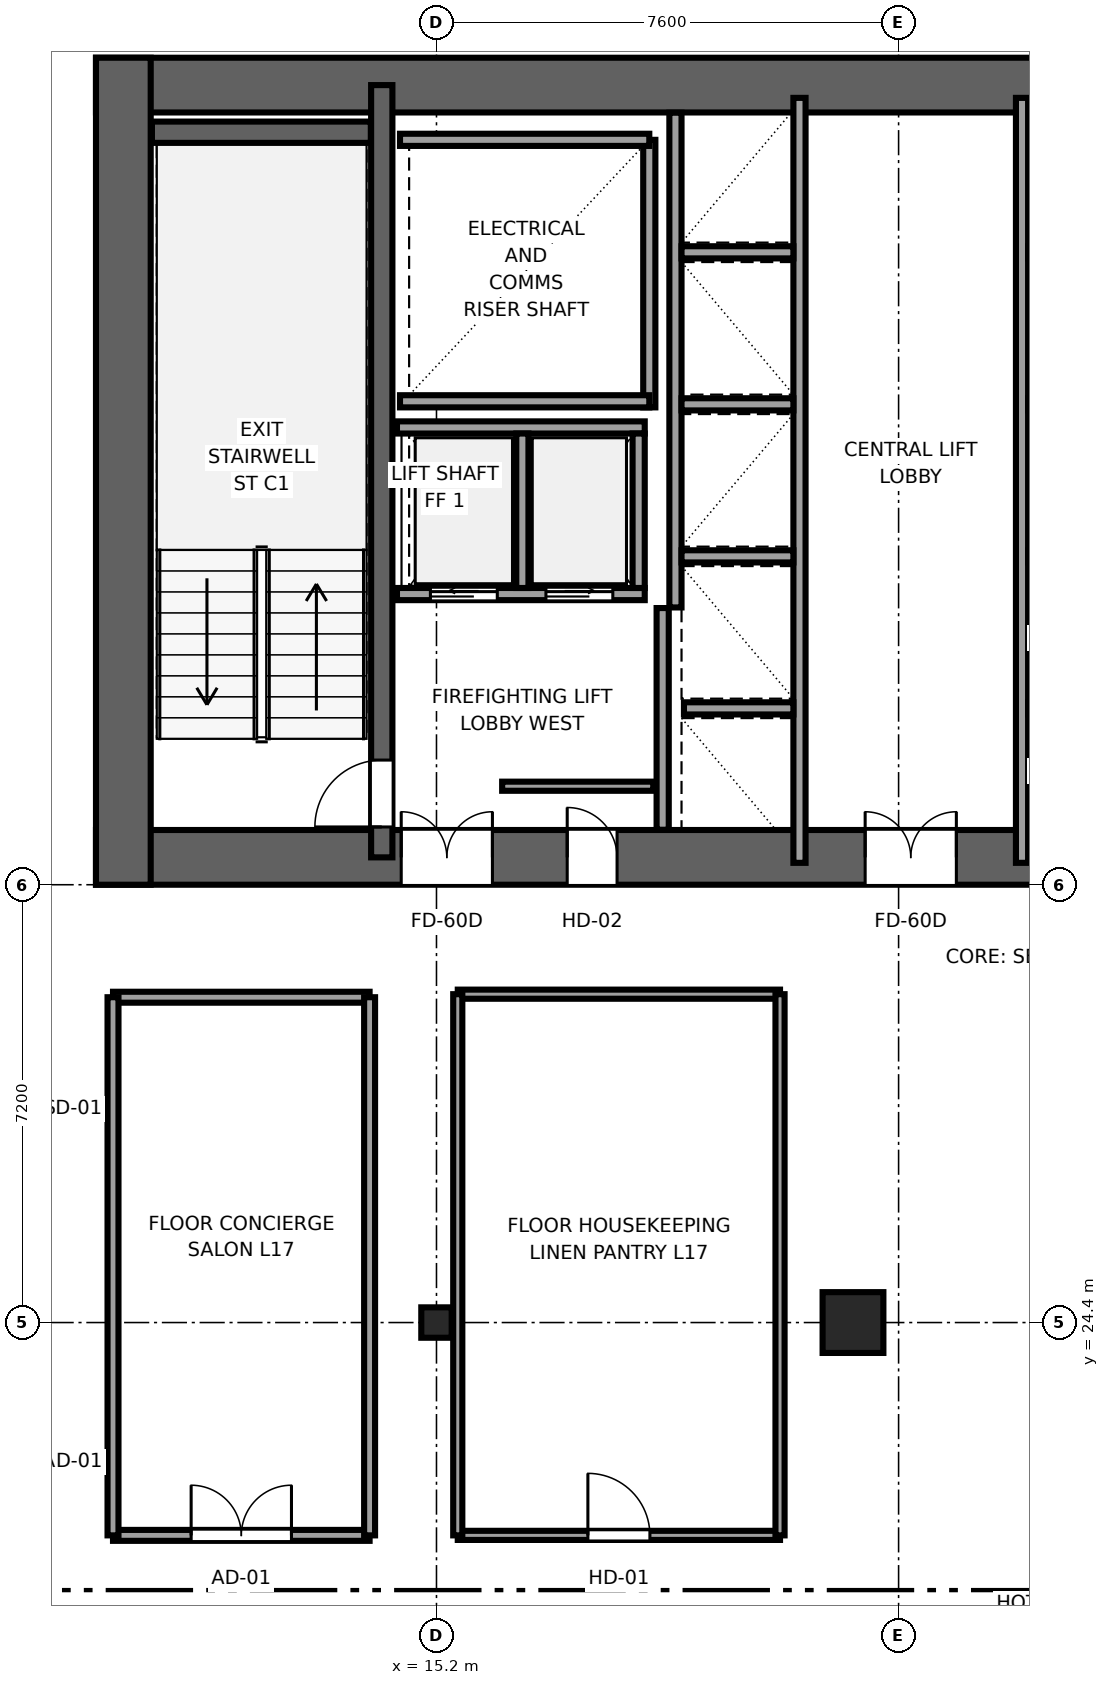
"""IFC4 building model, lengths in metres.
Left out: names, types, materials, properties, quantities, classifications, styles, units other than length and angle.
Written with IfcOpenShell. Run it as: python <this file> out.ifc"""

import sys

from ifc_helpers import new_model, si_unit, direction, frame, frame_2d, origin, origin_2d, place, context, subcontext, project, spatial, rectangle, i_section, extrude, source, transform, mapped, element, fill, save


model = new_model("IFC4")
c1 = context("Model", 3, precision=1e-05, world=origin(), true_north=direction((0.0, 1.0)))
c2 = subcontext(c1, "Body", "Model", "MODEL_VIEW")
j1 = project(units=[si_unit("LENGTHUNIT", "METRE"), si_unit("PLANEANGLEUNIT", "RADIAN")], contexts=[c1])
p1 = place(None, origin())
s1 = spatial("IfcSite", under=j1, at=p1, CompositionType="ELEMENT")
p2 = place(p1, origin())
s2 = spatial("IfcBuilding", under=s1, at=p2, CompositionType="ELEMENT")
p3 = place(p2, frame((0.0, 0.0, 71.05)))
s3 = spatial("IfcBuildingStorey", under=s2, at=p3, CompositionType="ELEMENT", Elevation=71.05)
p4 = place(p3, frame((9.6, 32.05, 0.0), z_axis=(0.0, 0.0, 1.0), x_axis=(1.0, 0.0, 0.0)))
e1 = element("IfcWall", 1, at=p4, inside=s3, PredefinedType="SHEAR", context=c2, shape_type="SweptSolid", body=[
    extrude(rectangle(XDim=26.8, YDim=0.9, at=frame_2d((13.4, 0.0))), origin(), (0.0, 0.0, 1.0), 3.55),
])
p5 = place(p4, frame((6.52, 0.0, 0.0), z_axis=(0.0, 0.0, 1.0), x_axis=(-1.0, 0.0, 0.0)))
e2 = element("IfcOpeningElement", 2, at=p5, cuts=e1, PredefinedType="OPENING", context=c2, shape_type="SweptSolid", body=[
    extrude(rectangle(XDim=1.5, YDim=2.04, at=frame_2d((0.75, 1.02))), frame((0.0, 0.46, 0.0), z_axis=(0.0, -1.0, 0.0), x_axis=(1.0, 0.0, 0.0)), (0.0, 0.0, 1.0), 0.92),
])
p6 = place(p4, frame((14.15, 0.0, 0.0), z_axis=(0.0, 0.0, 1.0), x_axis=(-1.0, 0.0, 0.0)))
e3 = element("IfcOpeningElement", 3, at=p6, cuts=e1, PredefinedType="OPENING", context=c2, shape_type="SweptSolid", body=[
    extrude(rectangle(XDim=1.5, YDim=2.04, at=frame_2d((0.75, 1.02))), frame((0.0, 0.46, 0.0), z_axis=(0.0, -1.0, 0.0), x_axis=(1.0, 0.0, 0.0)), (0.0, 0.0, 1.0), 0.92),
])
p7 = place(p4, frame((21.78, 0.0, 0.0), z_axis=(0.0, 0.0, 1.0), x_axis=(-1.0, 0.0, 0.0)))
e4 = element("IfcOpeningElement", 4, at=p7, cuts=e1, PredefinedType="OPENING", context=c2, shape_type="SweptSolid", body=[
    extrude(rectangle(XDim=1.5, YDim=2.04, at=frame_2d((0.75, 1.02))), frame((0.0, 0.46, 0.0), z_axis=(0.0, -1.0, 0.0), x_axis=(1.0, 0.0, 0.0)), (0.0, 0.0, 1.0), 0.92),
])
p8 = place(p4, frame((8.57, 0.0, 0.0), z_axis=(0.0, 0.0, 1.0), x_axis=(-1.0, 0.0, 0.0)))
e5 = element("IfcOpeningElement", 5, at=p8, cuts=e1, PredefinedType="OPENING", context=c2, shape_type="SweptSolid", body=[
    extrude(rectangle(XDim=0.82, YDim=2.01, at=frame_2d((0.41, 1.005))), frame((0.0, 0.46, 0.0), z_axis=(0.0, -1.0, 0.0), x_axis=(1.0, 0.0, 0.0)), (0.0, 0.0, 1.0), 0.92),
])
p9 = place(p4, frame((19.07, 0.0, 0.0), z_axis=(0.0, 0.0, 1.0), x_axis=(-1.0, 0.0, 0.0)))
e6 = element("IfcOpeningElement", 6, at=p9, cuts=e1, PredefinedType="OPENING", context=c2, shape_type="SweptSolid", body=[
    extrude(rectangle(XDim=0.82, YDim=2.01, at=frame_2d((0.41, 1.005))), frame((0.0, 0.46, 0.0), z_axis=(0.0, -1.0, 0.0), x_axis=(1.0, 0.0, 0.0)), (0.0, 0.0, 1.0), 0.92),
])
p10 = place(p3, frame((9.6, 44.75, 0.0), z_axis=(0.0, 0.0, 1.0), x_axis=(1.0, 0.0, 0.0)))
e7 = element("IfcWall", 7, at=p10, inside=s3, PredefinedType="SHEAR", context=c2, shape_type="SweptSolid", body=[
    extrude(rectangle(XDim=26.8, YDim=0.9, at=frame_2d((13.4, 0.0))), origin(), (0.0, 0.0, 1.0), 3.55),
])
p11 = place(p3, frame((10.05, 31.6, 0.0), z_axis=(0.0, 0.0, 1.0), x_axis=(0.0, 1.0, 0.0)))
e8 = element("IfcWall", 8, at=p11, inside=s3, PredefinedType="SHEAR", context=c2, shape_type="SweptSolid", body=[
    extrude(rectangle(XDim=13.6, YDim=0.9, at=frame_2d((6.8, 0.0))), origin(), (0.0, 0.0, 1.0), 3.55),
])
p12 = place(p3, frame((14.3, 32.05, 0.0), z_axis=(0.0, 0.0, 1.0), x_axis=(0.0, 1.0, 0.0)))
e9 = element("IfcWall", 9, at=p12, inside=s3, PredefinedType="SHEAR", context=c2, shape_type="SweptSolid", body=[
    extrude(rectangle(XDim=12.7, YDim=0.35, at=frame_2d((6.35, 0.0))), origin(), (0.0, 0.0, 1.0), 3.55),
])
p13 = place(p12, frame((0.5, 0.0, 0.0)))
e10 = element("IfcOpeningElement", 10, at=p13, cuts=e9, PredefinedType="OPENING", context=c2, shape_type="SweptSolid", body=[
    extrude(rectangle(XDim=1.1, YDim=2.12, at=frame_2d((0.55, 1.06))), frame((0.0, 0.185, 0.0), z_axis=(0.0, -1.0, 0.0), x_axis=(1.0, 0.0, 0.0)), (0.0, 0.0, 1.0), 0.37),
])
p14 = place(p3, frame((10.52, 43.975, 0.0), z_axis=(0.0, 0.0, 1.0), x_axis=(1.0, 0.0, 0.0)))
e11 = element("IfcWall", 11, at=p14, inside=s3, PredefinedType="SHEAR", context=c2, shape_type="SweptSolid", body=[
    extrude(rectangle(XDim=3.6, YDim=0.35, at=frame_2d((1.8, 0.0))), origin(), (0.0, 0.0, 1.0), 3.55),
])
m1 = source(origin(), c2, "Body", "SweptSolid", [
    extrude(i_section(OverallWidth=0.5, OverallDepth=0.5, WebThickness=0.028, FlangeThickness=0.045, at=origin_2d()), origin(), (0.0, 0.0, 1.0), 3.55),
])
p15 = place(p3, frame((15.2, 24.4, 0.0), z_axis=(0.0, 0.0, 1.0), x_axis=(1.0, 0.0, 0.0)))
e12 = element("IfcColumn", 12, at=p15, inside=s3, PredefinedType="COLUMN", context=c2, shape_type="MappedRepresentation", body=[
    mapped(m1, transform((0.0, 0.0, 0.0), x_axis=(1.0, 0.0, 0.0), y_axis=(0.0, 1.0, 0.0), z_axis=(0.0, 0.0, 1.0), scale=1.0)),
])
m2 = source(origin(), c2, "Body", "SweptSolid", [
    extrude(rectangle(XDim=1.0, YDim=1.0, at=origin_2d()), origin(), (0.0, 0.0, 1.0), 3.55),
])
p16 = place(p3, frame((22.05, 24.4, 0.0), z_axis=(0.0, 0.0, 1.0), x_axis=(1.0, 0.0, 0.0)))
e13 = element("IfcColumn", 13, at=p16, inside=s3, PredefinedType="COLUMN", context=c2, shape_type="MappedRepresentation", body=[
    mapped(m2, transform((0.0, 0.0, 0.0), x_axis=(1.0, 0.0, 0.0), y_axis=(0.0, 1.0, 0.0), z_axis=(0.0, 0.0, 1.0), scale=1.0)),
])
p17 = place(p3, frame((18.7, 39.45, 0.0), z_axis=(0.0, 0.0, 1.0), x_axis=(0.0, 1.0, 0.0)))
e14 = element("IfcWall", 14, at=p17, inside=s3, PredefinedType="SOLIDWALL", context=c2, shape_type="SweptSolid", body=[
    extrude(rectangle(XDim=4.4, YDim=0.2, at=frame_2d((2.2, 0.0))), origin(), (0.0, 0.0, 1.0), 3.37),
])
for number, where, z_axis, x_axis in (
    (15, (14.6, 39.55, 0.0), (0.0, 0.0, 1.0), (1.0, 0.0, 0.0)),
    (16, (14.6, 43.85, 0.0), (0.0, 0.0, 1.0), (1.0, 0.0, 0.0)),
):
    element("IfcWall", number, at=place(p3, frame(where, z_axis=z_axis, x_axis=x_axis)), inside=s3, PredefinedType="SOLIDWALL", context=c2, shape_type="SweptSolid", body=[
        extrude(rectangle(XDim=4.1, YDim=0.2, at=frame_2d((2.05, 0.0))), origin(), (0.0, 0.0, 1.0), 3.37),
    ])
p18 = place(p3, frame((18.92, 32.504, 0.0), z_axis=(0.0, 0.0, 1.0), x_axis=(0.0, 1.0, 0.0)))
e17 = element("IfcWall", 17, at=p18, inside=s3, PredefinedType="SOLIDWALL", context=c2, shape_type="SweptSolid", body=[
    extrude(rectangle(XDim=3.646, YDim=0.2, at=frame_2d((1.823, 0.0))), origin(), (0.0, 0.0, 1.0), 3.37),
])
p19 = place(p3, frame((21.17, 31.96, 0.0), z_axis=(0.0, 0.0, 1.0), x_axis=(0.0, 1.0, 0.0)))
e18 = element("IfcWall", 18, at=p19, inside=s3, PredefinedType="SOLIDWALL", context=c2, shape_type="SweptSolid", body=[
    extrude(rectangle(XDim=12.58, YDim=0.2, at=frame_2d((6.29, 0.0))), origin(), (0.0, 0.0, 1.0), 3.37),
])
p20 = place(p3, frame((19.13, 36.16, 0.0), z_axis=(0.0, 0.0, 1.0), x_axis=(0.0, 1.0, 0.0)))
e19 = element("IfcWall", 19, at=p20, inside=s3, PredefinedType="SOLIDWALL", context=c2, shape_type="SweptSolid", body=[
    extrude(rectangle(XDim=8.136, YDim=0.2, at=frame_2d((4.068, 0.0))), origin(), (0.0, 0.0, 1.0), 3.37),
])
p21 = place(p3, frame((19.27, 34.5, 0.0), z_axis=(0.0, 0.0, 1.0), x_axis=(1.0, 0.0, 0.0)))
e20 = element("IfcWall", 20, at=p21, inside=s3, PredefinedType="SOLIDWALL", context=c2, shape_type="SweptSolid", body=[
    extrude(rectangle(XDim=1.8, YDim=0.2, at=frame_2d((0.9, 0.0))), origin(), (0.0, 0.0, 1.0), 3.37),
])
for number, where, z_axis, x_axis in (
    (21, (19.23, 37.0, 0.0), (0.0, 0.0, 1.0), (1.0, 0.0, 0.0)),
    (22, (19.23, 39.5, 0.0), (0.0, 0.0, 1.0), (1.0, 0.0, 0.0)),
    (23, (19.23, 42.0, 0.0), (0.0, 0.0, 1.0), (1.0, 0.0, 0.0)),
):
    element("IfcWall", number, at=place(p3, frame(where, z_axis=z_axis, x_axis=x_axis)), inside=s3, PredefinedType="SOLIDWALL", context=c2, shape_type="SweptSolid", body=[
        extrude(rectangle(XDim=1.84, YDim=0.2, at=frame_2d((0.92, 0.0))), origin(), (0.0, 0.0, 1.0), 3.37),
    ])
p22 = place(p3, frame((14.55, 36.38, 0.0), z_axis=(0.0, 0.0, 1.0), x_axis=(1.0, 0.0, 0.0)))
e24 = element("IfcWall", 24, at=p22, inside=s3, PredefinedType="SOLIDWALL", context=c2, shape_type="SweptSolid", body=[
    extrude(rectangle(XDim=4.075, YDim=0.2, at=frame_2d((2.038, 0.0))), origin(), (0.0, 0.0, 1.0), 3.37),
])
p23 = place(p22, frame((0.55, 0.0, 0.0)))
e25 = element("IfcOpeningElement", 25, at=p23, cuts=e24, PredefinedType="OPENING", context=c2, shape_type="SweptSolid", body=[
    extrude(rectangle(XDim=1.1, YDim=2.12, at=frame_2d((0.55, 1.06))), frame((0.0, 0.11, 0.0), z_axis=(0.0, -1.0, 0.0), x_axis=(1.0, 0.0, 0.0)), (0.0, 0.0, 1.0), 0.22),
])
p24 = place(p22, frame((2.45, 0.0, 0.0)))
e26 = element("IfcOpeningElement", 26, at=p24, cuts=e24, PredefinedType="OPENING", context=c2, shape_type="SweptSolid", body=[
    extrude(rectangle(XDim=1.1, YDim=2.12, at=frame_2d((0.55, 1.06))), frame((0.0, 0.11, 0.0), z_axis=(0.0, -1.0, 0.0), x_axis=(1.0, 0.0, 0.0)), (0.0, 0.0, 1.0), 0.22),
])
p25 = place(p3, frame((14.55, 39.12, 0.0), z_axis=(0.0, 0.0, 1.0), x_axis=(1.0, 0.0, 0.0)))
e27 = element("IfcWall", 27, at=p25, inside=s3, PredefinedType="SOLIDWALL", context=c2, shape_type="SweptSolid", body=[
    extrude(rectangle(XDim=4.075, YDim=0.2, at=frame_2d((2.038, 0.0))), origin(), (0.0, 0.0, 1.0), 3.37),
])
for number, where, z_axis, x_axis in (
    (28, (18.525, 36.48, 0.0), (0.0, 0.0, 1.0), (0.0, 1.0, 0.0)),
    (29, (16.613, 36.48, 0.0), (0.0, 0.0, 1.0), (0.0, 1.0, 0.0)),
):
    element("IfcWall", number, at=place(p3, frame(where, z_axis=z_axis, x_axis=x_axis)), inside=s3, PredefinedType="SOLIDWALL", context=c2, shape_type="SweptSolid", body=[
        extrude(rectangle(XDim=2.54, YDim=0.2, at=frame_2d((1.27, 0.0))), origin(), (0.0, 0.0, 1.0), 3.37),
    ])
p26 = place(p3, frame((24.83, 31.96, 0.0), z_axis=(0.0, 0.0, 1.0), x_axis=(0.0, 1.0, 0.0)))
e30 = element("IfcWall", 30, at=p26, inside=s3, PredefinedType="SOLIDWALL", context=c2, shape_type="SweptSolid", body=[
    extrude(rectangle(XDim=12.58, YDim=0.2, at=frame_2d((6.29, 0.0))), origin(), (0.0, 0.0, 1.0), 3.37),
])
p27 = place(p3, frame((24.93, 34.5, 0.0), z_axis=(0.0, 0.0, 1.0), x_axis=(1.0, 0.0, 0.0)))
e31 = element("IfcWall", 31, at=p27, inside=s3, PredefinedType="SOLIDWALL", context=c2, shape_type="SweptSolid", body=[
    extrude(rectangle(XDim=1.8, YDim=0.2, at=frame_2d((0.9, 0.0))), origin(), (0.0, 0.0, 1.0), 3.37),
])
for number, where, z_axis, x_axis in (
    (32, (24.93, 37.0, 0.0), (0.0, 0.0, 1.0), (1.0, 0.0, 0.0)),
    (33, (24.93, 39.5, 0.0), (0.0, 0.0, 1.0), (1.0, 0.0, 0.0)),
    (34, (24.93, 42.0, 0.0), (0.0, 0.0, 1.0), (1.0, 0.0, 0.0)),
):
    element("IfcWall", number, at=place(p3, frame(where, z_axis=z_axis, x_axis=x_axis)), inside=s3, PredefinedType="SOLIDWALL", context=c2, shape_type="SweptSolid", body=[
        extrude(rectangle(XDim=1.84, YDim=0.2, at=frame_2d((0.92, 0.0))), origin(), (0.0, 0.0, 1.0), 3.37),
    ])
p28 = place(p3, frame((16.28, 33.22, 0.0), z_axis=(0.0, 0.0, 1.0), x_axis=(1.0, 0.0, 0.0)))
e35 = element("IfcWall", 35, at=p28, inside=s3, PredefinedType="PARTITIONING", context=c2, shape_type="SweptSolid", body=[
    extrude(rectangle(XDim=2.485, YDim=0.15, at=frame_2d((1.242, 0.0))), origin(), (0.0, 0.0, 1.0), 3.37),
])
p29 = place(p3, frame((9.88, 20.9, 0.0), z_axis=(0.0, 0.0, 1.0), x_axis=(1.0, 0.0, 0.0)))
e36 = element("IfcWall", 36, at=p29, inside=s3, PredefinedType="PARTITIONING", context=c2, shape_type="SweptSolid", body=[
    extrude(rectangle(XDim=4.22, YDim=0.18, at=frame_2d((2.11, 0.0))), origin(), (0.0, 0.0, 1.0), 3.37),
])
p30 = place(p29, frame((1.285, 0.0, 0.0)))
e37 = element("IfcOpeningElement", 37, at=p30, cuts=e36, PredefinedType="OPENING", context=c2, shape_type="SweptSolid", body=[
    extrude(rectangle(XDim=1.65, YDim=2.15, at=frame_2d((0.825, 1.075))), frame((0.0, 0.1, 0.0), z_axis=(0.0, -1.0, 0.0), x_axis=(1.0, 0.0, 0.0)), (0.0, 0.0, 1.0), 0.2),
])
p31 = place(p3, frame((9.88, 29.75, 0.0), z_axis=(0.0, 0.0, 1.0), x_axis=(1.0, 0.0, 0.0)))
e38 = element("IfcWall", 38, at=p31, inside=s3, PredefinedType="PARTITIONING", context=c2, shape_type="SweptSolid", body=[
    extrude(rectangle(XDim=4.22, YDim=0.18, at=frame_2d((2.11, 0.0))), origin(), (0.0, 0.0, 1.0), 3.37),
])
for number, where, z_axis, x_axis in (
    (39, (9.88, 20.9, 0.0), (0.0, 0.0, 1.0), (0.0, 1.0, 0.0)),
    (40, (14.1, 20.9, 0.0), (0.0, 0.0, 1.0), (0.0, 1.0, 0.0)),
):
    element("IfcWall", number, at=place(p3, frame(where, z_axis=z_axis, x_axis=x_axis)), inside=s3, PredefinedType="PARTITIONING", context=c2, shape_type="SweptSolid", body=[
        extrude(rectangle(XDim=8.85, YDim=0.18, at=frame_2d((4.425, 0.0))), origin(), (0.0, 0.0, 1.0), 3.37),
    ])
p32 = place(p3, frame((15.55, 20.9, 0.0), z_axis=(0.0, 0.0, 1.0), x_axis=(1.0, 0.0, 0.0)))
e41 = element("IfcWall", 41, at=p32, inside=s3, PredefinedType="PARTITIONING", context=c2, shape_type="SweptSolid", body=[
    extrude(rectangle(XDim=5.3, YDim=0.15, at=frame_2d((2.65, 0.0))), origin(), (0.0, 0.0, 1.0), 3.37),
])
p33 = place(p32, frame((2.14, 0.0, 0.0)))
e42 = element("IfcOpeningElement", 42, at=p33, cuts=e41, PredefinedType="OPENING", context=c2, shape_type="SweptSolid", body=[
    extrude(rectangle(XDim=1.02, YDim=2.03, at=frame_2d((0.51, 1.015))), frame((0.0, 0.085, 0.0), z_axis=(0.0, -1.0, 0.0), x_axis=(1.0, 0.0, 0.0)), (0.0, 0.0, 1.0), 0.17),
])
p34 = place(p3, frame((15.55, 29.8, 0.0), z_axis=(0.0, 0.0, 1.0), x_axis=(1.0, 0.0, 0.0)))
e43 = element("IfcWall", 43, at=p34, inside=s3, PredefinedType="PARTITIONING", context=c2, shape_type="SweptSolid", body=[
    extrude(rectangle(XDim=5.3, YDim=0.15, at=frame_2d((2.65, 0.0))), origin(), (0.0, 0.0, 1.0), 3.37),
])
for number, where, z_axis, x_axis in (
    (44, (15.55, 20.9, 0.0), (0.0, 0.0, 1.0), (0.0, 1.0, 0.0)),
    (45, (20.85, 20.9, 0.0), (0.0, 0.0, 1.0), (0.0, 1.0, 0.0)),
):
    element("IfcWall", number, at=place(p3, frame(where, z_axis=z_axis, x_axis=x_axis)), inside=s3, PredefinedType="PARTITIONING", context=c2, shape_type="SweptSolid", body=[
        extrude(rectangle(XDim=8.9, YDim=0.15, at=frame_2d((4.45, 0.0))), origin(), (0.0, 0.0, 1.0), 3.37),
    ])
m3 = source(origin(), c2, "Body", "SweptSolid", [
    extrude(rectangle(XDim=1.1, YDim=2.12, at=frame_2d((0.55, 1.06))), frame((0.0, 0.025, 0.0), z_axis=(0.0, -1.0, 0.0), x_axis=(1.0, 0.0, 0.0)), (0.0, 0.0, 1.0), 0.05),
])
p35 = place(p13, origin())
e46 = element("IfcDoor", 46, at=p35, inside=s3, OperationType="SINGLE_SWING_LEFT", PredefinedType="DOOR", context=c2, shape_type="MappedRepresentation", body=[
    mapped(m3, transform((0.0, 0.0, 0.0), x_axis=(1.0, 0.0, 0.0), y_axis=(0.0, 1.0, 0.0), z_axis=(0.0, 0.0, 1.0), scale=1.0)),
])
fill(e10, e46)
m4 = source(origin(), c2, "Body", "SweptSolid", [
    extrude(rectangle(XDim=1.5, YDim=2.04, at=frame_2d((0.75, 1.02))), frame((0.0, 0.025, 0.0), z_axis=(0.0, -1.0, 0.0), x_axis=(1.0, 0.0, 0.0)), (0.0, 0.0, 1.0), 0.05),
])
p36 = place(p5, origin())
e47 = element("IfcDoor", 47, at=p36, inside=s3, OperationType="DOUBLE_DOOR_SINGLE_SWING", PredefinedType="DOOR", context=c2, shape_type="MappedRepresentation", body=[
    mapped(m4, transform((0.0, 0.0, 0.0), x_axis=(1.0, 0.0, 0.0), y_axis=(0.0, 1.0, 0.0), z_axis=(0.0, 0.0, 1.0), scale=1.0)),
])
fill(e2, e47)
p37 = place(p6, origin())
e48 = element("IfcDoor", 48, at=p37, inside=s3, OperationType="DOUBLE_DOOR_SINGLE_SWING", PredefinedType="DOOR", context=c2, shape_type="MappedRepresentation", body=[
    mapped(m4, transform((0.0, 0.0, 0.0), x_axis=(1.0, 0.0, 0.0), y_axis=(0.0, 1.0, 0.0), z_axis=(0.0, 0.0, 1.0), scale=1.0)),
])
fill(e3, e48)
m5 = source(origin(), c2, "Body", "SweptSolid", [
    extrude(rectangle(XDim=0.82, YDim=2.01, at=frame_2d((0.41, 1.005))), frame((0.0, 0.025, 0.0), z_axis=(0.0, -1.0, 0.0), x_axis=(1.0, 0.0, 0.0)), (0.0, 0.0, 1.0), 0.05),
])
p38 = place(p8, origin())
e49 = element("IfcDoor", 49, at=p38, inside=s3, OperationType="SINGLE_SWING_LEFT", PredefinedType="DOOR", context=c2, shape_type="MappedRepresentation", body=[
    mapped(m5, transform((0.0, 0.0, 0.0), x_axis=(1.0, 0.0, 0.0), y_axis=(0.0, 1.0, 0.0), z_axis=(0.0, 0.0, 1.0), scale=1.0)),
])
fill(e5, e49)
m6 = source(origin(), c2, "Body", "SweptSolid", [
    extrude(rectangle(XDim=1.1, YDim=2.12, at=frame_2d((0.55, 1.06))), frame((0.0, 0.025, 0.0), z_axis=(0.0, -1.0, 0.0), x_axis=(1.0, 0.0, 0.0)), (0.0, 0.0, 1.0), 0.05),
])
p39 = place(p23, origin())
e50 = element("IfcDoor", 50, at=p39, inside=s3, OperationType="SLIDING_TO_LEFT", PredefinedType="DOOR", context=c2, shape_type="MappedRepresentation", body=[
    mapped(m6, transform((0.0, 0.0, 0.0), x_axis=(1.0, 0.0, 0.0), y_axis=(0.0, 1.0, 0.0), z_axis=(0.0, 0.0, 1.0), scale=1.0)),
])
fill(e25, e50)
p40 = place(p24, origin())
e51 = element("IfcDoor", 51, at=p40, inside=s3, OperationType="SLIDING_TO_RIGHT", PredefinedType="DOOR", context=c2, shape_type="MappedRepresentation", body=[
    mapped(m6, transform((0.0, 0.0, 0.0), x_axis=(1.0, 0.0, 0.0), y_axis=(0.0, 1.0, 0.0), z_axis=(0.0, 0.0, 1.0), scale=1.0)),
])
fill(e26, e51)
m7 = source(origin(), c2, "Body", "SweptSolid", [
    extrude(rectangle(XDim=1.65, YDim=2.15, at=frame_2d((0.825, 1.075))), frame((0.0, 0.025, 0.0), z_axis=(0.0, -1.0, 0.0), x_axis=(1.0, 0.0, 0.0)), (0.0, 0.0, 1.0), 0.05),
])
p41 = place(p30, origin())
e52 = element("IfcDoor", 52, at=p41, inside=s3, OperationType="DOUBLE_DOOR_SINGLE_SWING", PredefinedType="DOOR", context=c2, shape_type="MappedRepresentation", body=[
    mapped(m7, transform((0.0, 0.0, 0.0), x_axis=(1.0, 0.0, 0.0), y_axis=(0.0, 1.0, 0.0), z_axis=(0.0, 0.0, 1.0), scale=1.0)),
])
fill(e37, e52)
m8 = source(origin(), c2, "Body", "SweptSolid", [
    extrude(rectangle(XDim=1.02, YDim=2.03, at=frame_2d((0.51, 1.015))), frame((0.0, 0.025, 0.0), z_axis=(0.0, -1.0, 0.0), x_axis=(1.0, 0.0, 0.0)), (0.0, 0.0, 1.0), 0.05),
])
p42 = place(p33, origin())
e53 = element("IfcDoor", 53, at=p42, inside=s3, OperationType="SINGLE_SWING_LEFT", PredefinedType="DOOR", context=c2, shape_type="MappedRepresentation", body=[
    mapped(m8, transform((0.0, 0.0, 0.0), x_axis=(1.0, 0.0, 0.0), y_axis=(0.0, 1.0, 0.0), z_axis=(0.0, 0.0, 1.0), scale=1.0)),
])
fill(e42, e53)
save(model, sys.argv[1])
